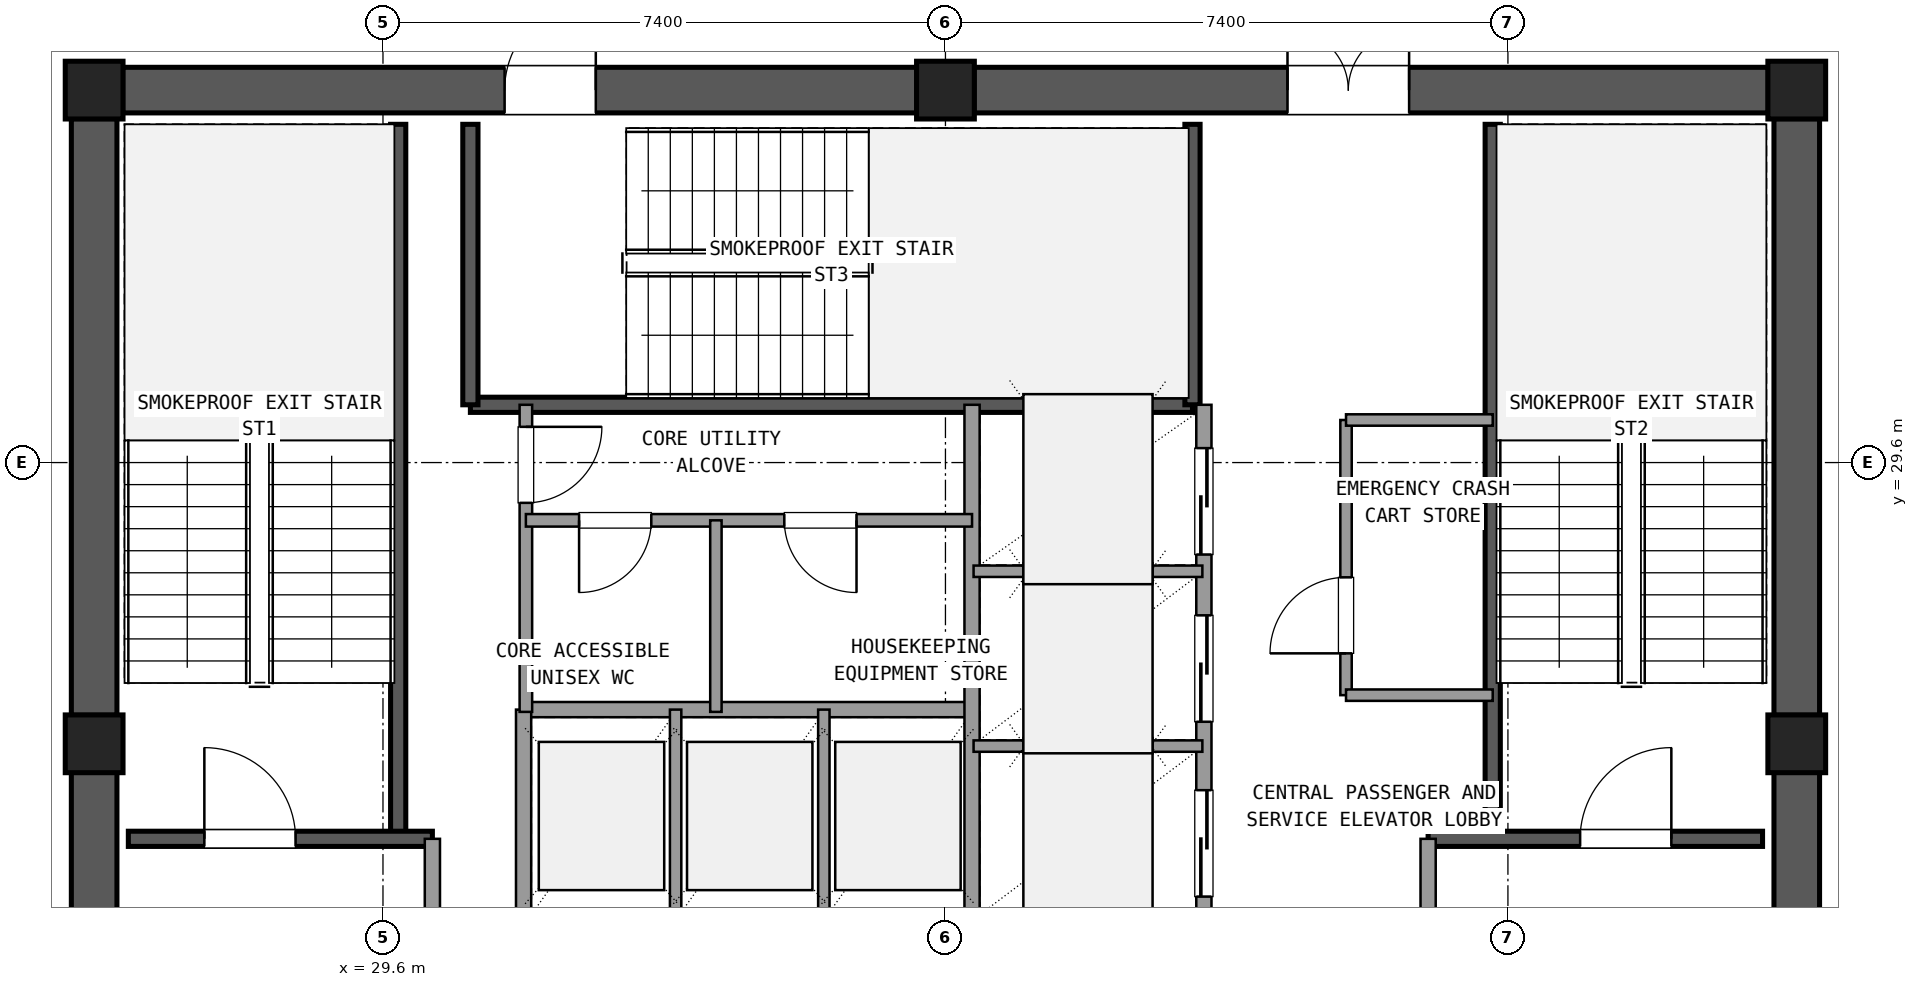
"""IFC4 building model, lengths in metres.
Left out: names, types, materials, properties, quantities, classifications, styles, units other than length and angle.
Written with IfcOpenShell. Run it as: python <this file> out.ifc"""

import sys

from ifc_helpers import new_model, si_unit, direction, frame, frame_2d, origin, origin_2d, place, context, subcontext, project, spatial, rectangle, extrude, element, fill, save


model = new_model("IFC4")
c1 = context("Model", 3, precision=1e-05, world=origin(), true_north=direction((0.0, 1.0)))
c2 = subcontext(c1, "Body", "Model", "MODEL_VIEW")
j1 = project(units=[si_unit("LENGTHUNIT", "METRE"), si_unit("PLANEANGLEUNIT", "RADIAN")], contexts=[c1])
p1 = place(None, origin())
s1 = spatial("IfcSite", under=j1, at=p1, CompositionType="ELEMENT")
p2 = place(p1, origin())
s2 = spatial("IfcBuilding", under=s1, at=p2, CompositionType="ELEMENT")
p3 = place(p2, frame((0.0, 0.0, 286.02)))
s3 = spatial("IfcBuildingStorey", under=s2, at=p3, CompositionType="ELEMENT", Elevation=286.02)
for number, where, z_axis, x_axis in (
    (1, (48.2, 25.9, 0.0), (0.0, 0.0, 1.0), (1.0, 0.0, 0.0)),
    (2, (48.2, 34.5, 0.0), (0.0, 0.0, 1.0), (1.0, 0.0, 0.0)),
    (3, (37.0, 34.5, 0.0), (0.0, 0.0, 1.0), (1.0, 0.0, 0.0)),
    (4, (25.8, 34.5, 0.0), (0.0, 0.0, 1.0), (1.0, 0.0, 0.0)),
    (5, (25.8, 25.9, 0.0), (0.0, 0.0, 1.0), (1.0, 0.0, 0.0)),
):
    element("IfcColumn", number, at=place(p3, frame(where, z_axis=z_axis, x_axis=x_axis)), inside=s3, PredefinedType="COLUMN", context=c2, shape_type="SweptSolid", body=[
        extrude(rectangle(XDim=0.76, YDim=0.76, at=origin_2d()), origin(), (0.0, 0.0, 1.0), 4.32),
    ])
p4 = place(p3, frame((48.2, 17.675, 0.0), z_axis=(0.0, 0.0, 1.0), x_axis=(0.0, 1.0, 0.0)))
e6 = element("IfcWall", 6, at=p4, inside=s3, PredefinedType="SHEAR", context=c2, shape_type="SweptSolid", body=[
    extrude(rectangle(XDim=7.85, YDim=0.6, at=frame_2d((3.925, 0.0))), origin(), (0.0, 0.0, 1.0), 4.02),
])
p5 = place(p4, frame((4.375, 0.0, 0.0)))
e7 = element("IfcOpeningElement", 7, at=p5, cuts=e6, PredefinedType="OPENING", context=c2, shape_type="SweptSolid", body=[
    extrude(rectangle(XDim=1.2, YDim=2.15, at=frame_2d((0.6, 1.075))), frame((0.0, 0.31, 0.0), z_axis=(0.0, -1.0, 0.0), x_axis=(1.0, 0.0, 0.0)), (0.0, 0.0, 1.0), 0.62),
])
p6 = place(p3, frame((48.2, 26.275, 0.0), z_axis=(0.0, 0.0, 1.0), x_axis=(0.0, 1.0, 0.0)))
e8 = element("IfcWall", 8, at=p6, inside=s3, PredefinedType="SHEAR", context=c2, shape_type="SweptSolid", body=[
    extrude(rectangle(XDim=7.85, YDim=0.6, at=frame_2d((3.925, 0.0))), origin(), (0.0, 0.0, 1.0), 4.02),
])
p7 = place(p3, frame((47.825, 34.5, 0.0), z_axis=(0.0, 0.0, 1.0), x_axis=(-1.0, 0.0, 0.0)))
e9 = element("IfcWall", 9, at=p7, inside=s3, PredefinedType="SHEAR", context=c2, shape_type="SweptSolid", body=[
    extrude(rectangle(XDim=10.45, YDim=0.6, at=frame_2d((5.225, 0.0))), origin(), (0.0, 0.0, 1.0), 4.02),
])
p8 = place(p7, frame((4.725, 0.0, 0.0)))
e10 = element("IfcOpeningElement", 10, at=p8, cuts=e9, PredefinedType="OPENING", context=c2, shape_type="SweptSolid", body=[
    extrude(rectangle(XDim=1.6, YDim=2.2, at=frame_2d((0.8, 1.1))), frame((0.0, 0.31, 0.0), z_axis=(0.0, -1.0, 0.0), x_axis=(1.0, 0.0, 0.0)), (0.0, 0.0, 1.0), 0.62),
])
p9 = place(p3, frame((36.625, 34.5, 0.0), z_axis=(0.0, 0.0, 1.0), x_axis=(-1.0, 0.0, 0.0)))
e11 = element("IfcWall", 11, at=p9, inside=s3, PredefinedType="SHEAR", context=c2, shape_type="SweptSolid", body=[
    extrude(rectangle(XDim=10.45, YDim=0.6, at=frame_2d((5.225, 0.0))), origin(), (0.0, 0.0, 1.0), 4.02),
])
p10 = place(p9, frame((4.225, 0.0, 0.0)))
e12 = element("IfcOpeningElement", 12, at=p10, cuts=e11, PredefinedType="OPENING", context=c2, shape_type="SweptSolid", body=[
    extrude(rectangle(XDim=1.2, YDim=2.15, at=frame_2d((0.6, 1.075))), frame((0.0, 0.31, 0.0), z_axis=(0.0, -1.0, 0.0), x_axis=(1.0, 0.0, 0.0)), (0.0, 0.0, 1.0), 0.62),
])
p11 = place(p3, frame((25.8, 34.125, 0.0), z_axis=(0.0, 0.0, 1.0), x_axis=(0.0, -1.0, 0.0)))
e13 = element("IfcWall", 13, at=p11, inside=s3, PredefinedType="SHEAR", context=c2, shape_type="SweptSolid", body=[
    extrude(rectangle(XDim=7.85, YDim=0.6, at=frame_2d((3.925, 0.0))), origin(), (0.0, 0.0, 1.0), 4.02),
])
p12 = place(p3, frame((25.8, 25.525, 0.0), z_axis=(0.0, 0.0, 1.0), x_axis=(0.0, -1.0, 0.0)))
e14 = element("IfcWall", 14, at=p12, inside=s3, PredefinedType="SHEAR", context=c2, shape_type="SweptSolid", body=[
    extrude(rectangle(XDim=7.85, YDim=0.6, at=frame_2d((3.925, 0.0))), origin(), (0.0, 0.0, 1.0), 4.02),
])
p13 = place(p12, frame((2.275, 0.0, 0.0)))
e15 = element("IfcOpeningElement", 15, at=p13, cuts=e14, PredefinedType="OPENING", context=c2, shape_type="SweptSolid", body=[
    extrude(rectangle(XDim=1.2, YDim=2.15, at=frame_2d((0.6, 1.075))), frame((0.0, 0.31, 0.0), z_axis=(0.0, -1.0, 0.0), x_axis=(1.0, 0.0, 0.0)), (0.0, 0.0, 1.0), 0.62),
])
p14 = place(p3, frame((29.8, 24.65, 0.0), z_axis=(0.0, 0.0, 1.0), x_axis=(0.0, 1.0, 0.0)))
e16 = element("IfcWall", 16, at=p14, inside=s3, PredefinedType="SHEAR", context=c2, shape_type="SweptSolid", body=[
    extrude(rectangle(XDim=9.4, YDim=0.2, at=frame_2d((4.7, 0.0))), origin(), (0.0, 0.0, 1.0), 4.02),
])
p15 = place(p3, frame((26.25, 24.65, 0.0), z_axis=(0.0, 0.0, 1.0), x_axis=(1.0, 0.0, 0.0)))
e17 = element("IfcWall", 17, at=p15, inside=s3, PredefinedType="SHEAR", context=c2, shape_type="SweptSolid", body=[
    extrude(rectangle(XDim=4.0, YDim=0.2, at=frame_2d((2.0, 0.0))), origin(), (0.0, 0.0, 1.0), 4.02),
])
p16 = place(p15, frame((1.0, 0.0, 0.0)))
e18 = element("IfcOpeningElement", 18, at=p16, cuts=e17, PredefinedType="OPENING", context=c2, shape_type="SweptSolid", body=[
    extrude(rectangle(XDim=1.2, YDim=2.15, at=frame_2d((0.6, 1.075))), frame((0.0, 0.11, 0.0), z_axis=(0.0, -1.0, 0.0), x_axis=(1.0, 0.0, 0.0)), (0.0, 0.0, 1.0), 0.22),
])
p17 = place(p3, frame((44.2, 24.65, 0.0), z_axis=(0.0, 0.0, 1.0), x_axis=(0.0, 1.0, 0.0)))
e19 = element("IfcWall", 19, at=p17, inside=s3, PredefinedType="SHEAR", context=c2, shape_type="SweptSolid", body=[
    extrude(rectangle(XDim=9.4, YDim=0.2, at=frame_2d((4.7, 0.0))), origin(), (0.0, 0.0, 1.0), 4.02),
])
p18 = place(p3, frame((43.35, 24.65, 0.0), z_axis=(0.0, 0.0, 1.0), x_axis=(1.0, 0.0, 0.0)))
e20 = element("IfcWall", 20, at=p18, inside=s3, PredefinedType="SHEAR", context=c2, shape_type="SweptSolid", body=[
    extrude(rectangle(XDim=4.4, YDim=0.2, at=frame_2d((2.2, 0.0))), origin(), (0.0, 0.0, 1.0), 4.02),
])
p19 = place(p18, frame((2.0, 0.0, 0.0)))
e21 = element("IfcOpeningElement", 21, at=p19, cuts=e20, PredefinedType="OPENING", context=c2, shape_type="SweptSolid", body=[
    extrude(rectangle(XDim=1.2, YDim=2.15, at=frame_2d((0.6, 1.075))), frame((0.0, 0.11, 0.0), z_axis=(0.0, -1.0, 0.0), x_axis=(1.0, 0.0, 0.0)), (0.0, 0.0, 1.0), 0.22),
])
p20 = place(p3, frame((30.75, 30.36, 0.0), z_axis=(0.0, 0.0, 1.0), x_axis=(1.0, 0.0, 0.0)))
e22 = element("IfcWall", 22, at=p20, inside=s3, PredefinedType="SHEAR", context=c2, shape_type="SweptSolid", body=[
    extrude(rectangle(XDim=9.5, YDim=0.2, at=frame_2d((4.75, 0.0))), origin(), (0.0, 0.0, 1.0), 4.02),
])
for number, where, z_axis, x_axis in (
    (23, (30.75, 30.36, 0.0), (0.0, 0.0, 1.0), (0.0, 1.0, 0.0)),
    (24, (40.25, 30.36, 0.0), (0.0, 0.0, 1.0), (0.0, 1.0, 0.0)),
):
    element("IfcWall", number, at=place(p3, frame(where, z_axis=z_axis, x_axis=x_axis)), inside=s3, PredefinedType="SHEAR", context=c2, shape_type="SweptSolid", body=[
        extrude(rectangle(XDim=3.69, YDim=0.2, at=frame_2d((1.845, 0.0))), origin(), (0.0, 0.0, 1.0), 4.02),
    ])
p21 = place(p3, frame((30.25, 17.75, 0.0), z_axis=(0.0, 0.0, 1.0), x_axis=(0.0, 1.0, 0.0)))
e25 = element("IfcWall", 25, at=p21, inside=s3, PredefinedType="SOLIDWALL", context=c2, shape_type="SweptSolid", body=[
    extrude(rectangle(XDim=6.9, YDim=0.2, at=frame_2d((3.45, 0.0))), origin(), (0.0, 0.0, 1.0), 2.93),
])
p22 = place(p21, frame((4.15, 0.0, 0.0)))
e26 = element("IfcOpeningElement", 26, at=p22, cuts=e25, PredefinedType="OPENING", context=c2, shape_type="SweptSolid", body=[
    extrude(rectangle(XDim=1.2, YDim=2.15, at=frame_2d((0.6, 1.075))), frame((0.0, 0.11, 0.0), z_axis=(0.0, -1.0, 0.0), x_axis=(1.0, 0.0, 0.0)), (0.0, 0.0, 1.0), 0.22),
])
p23 = place(p3, frame((43.35, 17.75, 0.0), z_axis=(0.0, 0.0, 1.0), x_axis=(0.0, 1.0, 0.0)))
e27 = element("IfcWall", 27, at=p23, inside=s3, PredefinedType="SOLIDWALL", context=c2, shape_type="SweptSolid", body=[
    extrude(rectangle(XDim=6.9, YDim=0.2, at=frame_2d((3.45, 0.0))), origin(), (0.0, 0.0, 1.0), 2.93),
])
p24 = place(p23, frame((4.15, 0.0, 0.0)))
e28 = element("IfcOpeningElement", 28, at=p24, cuts=e27, PredefinedType="OPENING", context=c2, shape_type="SweptSolid", body=[
    extrude(rectangle(XDim=1.2, YDim=2.15, at=frame_2d((0.6, 1.075))), frame((0.0, 0.11, 0.0), z_axis=(0.0, -1.0, 0.0), x_axis=(1.0, 0.0, 0.0)), (0.0, 0.0, 1.0), 0.22),
])
p25 = place(p3, frame((31.45, 26.35, 0.0), z_axis=(0.0, 0.0, 1.0), x_axis=(1.0, 0.0, 0.0)))
e29 = element("IfcWall", 29, at=p25, inside=s3, PredefinedType="SOLIDWALL", context=c2, shape_type="SweptSolid", body=[
    extrude(rectangle(XDim=5.9, YDim=0.2, at=frame_2d((2.95, 0.0))), origin(), (0.0, 0.0, 1.0), 2.93),
])
p26 = place(p3, frame((31.45, 23.54, 0.0), z_axis=(0.0, 0.0, 1.0), x_axis=(0.0, 1.0, 0.0)))
e30 = element("IfcWall", 30, at=p26, inside=s3, PredefinedType="SOLIDWALL", context=c2, shape_type="SweptSolid", body=[
    extrude(rectangle(XDim=2.81, YDim=0.2, at=frame_2d((1.405, 0.0))), origin(), (0.0, 0.0, 1.0), 2.93),
])
for number, where, z_axis, x_axis in (
    (31, (33.45, 23.54, 0.0), (0.0, 0.0, 1.0), (0.0, 1.0, 0.0)),
    (32, (35.4, 23.54, 0.0), (0.0, 0.0, 1.0), (0.0, 1.0, 0.0)),
):
    element("IfcWall", number, at=place(p3, frame(where, z_axis=z_axis, x_axis=x_axis)), inside=s3, PredefinedType="PARTITIONING", context=c2, shape_type="SweptSolid", body=[
        extrude(rectangle(XDim=2.81, YDim=0.15, at=frame_2d((1.405, 0.0))), origin(), (0.0, 0.0, 1.0), 2.93),
    ])
p27 = place(p3, frame((37.35, 23.54, 0.0), z_axis=(0.0, 0.0, 1.0), x_axis=(0.0, 1.0, 0.0)))
e33 = element("IfcWall", 33, at=p27, inside=s3, PredefinedType="SOLIDWALL", context=c2, shape_type="SweptSolid", body=[
    extrude(rectangle(XDim=6.82, YDim=0.2, at=frame_2d((3.41, 0.0))), origin(), (0.0, 0.0, 1.0), 2.93),
])
p28 = place(p3, frame((40.4, 23.54, 0.0), z_axis=(0.0, 0.0, 1.0), x_axis=(0.0, 1.0, 0.0)))
e34 = element("IfcWall", 34, at=p28, inside=s3, PredefinedType="SOLIDWALL", context=c2, shape_type="SweptSolid", body=[
    extrude(rectangle(XDim=6.82, YDim=0.2, at=frame_2d((3.41, 0.0))), origin(), (0.0, 0.0, 1.0), 2.93),
])
p29 = place(p28, frame((0.35, 0.0, 0.0)))
e35 = element("IfcOpeningElement", 35, at=p29, cuts=e34, PredefinedType="OPENING", context=c2, shape_type="SweptSolid", body=[
    extrude(rectangle(XDim=1.4, YDim=2.2, at=frame_2d((0.7, 1.1))), frame((0.0, 0.11, 0.0), z_axis=(0.0, -1.0, 0.0), x_axis=(1.0, 0.0, 0.0)), (0.0, 0.0, 1.0), 0.22),
])
p30 = place(p28, frame((2.65, 0.0, 0.0)))
e36 = element("IfcOpeningElement", 36, at=p30, cuts=e34, PredefinedType="OPENING", context=c2, shape_type="SweptSolid", body=[
    extrude(rectangle(XDim=1.4, YDim=2.2, at=frame_2d((0.7, 1.1))), frame((0.0, 0.11, 0.0), z_axis=(0.0, -1.0, 0.0), x_axis=(1.0, 0.0, 0.0)), (0.0, 0.0, 1.0), 0.22),
])
p31 = place(p28, frame((4.85, 0.0, 0.0)))
e37 = element("IfcOpeningElement", 37, at=p31, cuts=e34, PredefinedType="OPENING", context=c2, shape_type="SweptSolid", body=[
    extrude(rectangle(XDim=1.4, YDim=2.2, at=frame_2d((0.7, 1.1))), frame((0.0, 0.11, 0.0), z_axis=(0.0, -1.0, 0.0), x_axis=(1.0, 0.0, 0.0)), (0.0, 0.0, 1.0), 0.22),
])
for number, where, z_axis, x_axis in (
    (38, (37.37, 25.87, 0.0), (0.0, 0.0, 1.0), (1.0, 0.0, 0.0)),
    (39, (37.37, 28.17, 0.0), (0.0, 0.0, 1.0), (1.0, 0.0, 0.0)),
):
    element("IfcWall", number, at=place(p3, frame(where, z_axis=z_axis, x_axis=x_axis)), inside=s3, PredefinedType="PARTITIONING", context=c2, shape_type="SweptSolid", body=[
        extrude(rectangle(XDim=3.01, YDim=0.15, at=frame_2d((1.505, 0.0))), origin(), (0.0, 0.0, 1.0), 2.93),
    ])
p32 = place(p3, frame((42.27, 26.54, 0.0), z_axis=(0.0, 0.0, 1.0), x_axis=(0.0, 1.0, 0.0)))
e40 = element("IfcWall", 40, at=p32, inside=s3, PredefinedType="PARTITIONING", context=c2, shape_type="SweptSolid", body=[
    extrude(rectangle(XDim=3.62, YDim=0.15, at=frame_2d((1.81, 0.0))), origin(), (0.0, 0.0, 1.0), 2.93),
])
p33 = place(p32, frame((0.55, 0.0, 0.0)))
e41 = element("IfcOpeningElement", 41, at=p33, cuts=e40, PredefinedType="OPENING", context=c2, shape_type="SweptSolid", body=[
    extrude(rectangle(XDim=1.0, YDim=2.15, at=frame_2d((0.5, 1.075))), frame((0.0, 0.085, 0.0), z_axis=(0.0, -1.0, 0.0), x_axis=(1.0, 0.0, 0.0)), (0.0, 0.0, 1.0), 0.17),
])
for number, where, z_axis, x_axis in (
    (42, (42.27, 26.54, 0.0), (0.0, 0.0, 1.0), (1.0, 0.0, 0.0)),
    (43, (42.27, 30.16, 0.0), (0.0, 0.0, 1.0), (1.0, 0.0, 0.0)),
):
    element("IfcWall", number, at=place(p3, frame(where, z_axis=z_axis, x_axis=x_axis)), inside=s3, PredefinedType="PARTITIONING", context=c2, shape_type="SweptSolid", body=[
        extrude(rectangle(XDim=1.93, YDim=0.15, at=frame_2d((0.965, 0.0))), origin(), (0.0, 0.0, 1.0), 2.93),
    ])
p34 = place(p3, frame((31.48, 26.32, 0.0), z_axis=(0.0, 0.0, 1.0), x_axis=(0.0, 1.0, 0.0)))
e44 = element("IfcWall", 44, at=p34, inside=s3, PredefinedType="PLUMBINGWALL", context=c2, shape_type="SweptSolid", body=[
    extrude(rectangle(XDim=4.04, YDim=0.165, at=frame_2d((2.02, 0.0))), origin(), (0.0, 0.0, 1.0), 2.93),
])
p35 = place(p34, frame((2.75, 0.0, 0.0)))
e45 = element("IfcOpeningElement", 45, at=p35, cuts=e44, PredefinedType="OPENING", context=c2, shape_type="SweptSolid", body=[
    extrude(rectangle(XDim=1.0, YDim=2.15, at=frame_2d((0.5, 1.075))), frame((0.0, 0.093, 0.0), z_axis=(0.0, -1.0, 0.0), x_axis=(1.0, 0.0, 0.0)), (0.0, 0.0, 1.0), 0.185),
])
p36 = place(p3, frame((31.48, 28.84, 0.0), z_axis=(0.0, 0.0, 1.0), x_axis=(1.0, 0.0, 0.0)))
e46 = element("IfcWall", 46, at=p36, inside=s3, PredefinedType="PLUMBINGWALL", context=c2, shape_type="SweptSolid", body=[
    extrude(rectangle(XDim=5.87, YDim=0.165, at=frame_2d((2.935, 0.0))), origin(), (0.0, 0.0, 1.0), 2.93),
])
p37 = place(p36, frame((0.7, 0.0, 0.0)))
e47 = element("IfcOpeningElement", 47, at=p37, cuts=e46, PredefinedType="OPENING", context=c2, shape_type="SweptSolid", body=[
    extrude(rectangle(XDim=0.95, YDim=2.1, at=frame_2d((0.475, 1.05))), frame((0.0, 0.093, 0.0), z_axis=(0.0, -1.0, 0.0), x_axis=(1.0, 0.0, 0.0)), (0.0, 0.0, 1.0), 0.185),
])
p38 = place(p36, frame((3.4, 0.0, 0.0)))
e48 = element("IfcOpeningElement", 48, at=p38, cuts=e46, PredefinedType="OPENING", context=c2, shape_type="SweptSolid", body=[
    extrude(rectangle(XDim=0.95, YDim=2.1, at=frame_2d((0.475, 1.05))), frame((0.0, 0.093, 0.0), z_axis=(0.0, -1.0, 0.0), x_axis=(1.0, 0.0, 0.0)), (0.0, 0.0, 1.0), 0.185),
])
p39 = place(p3, frame((33.98, 26.32, 0.0), z_axis=(0.0, 0.0, 1.0), x_axis=(0.0, 1.0, 0.0)))
e49 = element("IfcWall", 49, at=p39, inside=s3, PredefinedType="PARTITIONING", context=c2, shape_type="SweptSolid", body=[
    extrude(rectangle(XDim=2.52, YDim=0.15, at=frame_2d((1.26, 0.0))), origin(), (0.0, 0.0, 1.0), 2.93),
])
p40 = place(p16, origin())
e50 = element("IfcDoor", 50, at=p40, inside=s3, OperationType="SINGLE_SWING_LEFT", PredefinedType="DOOR", context=c2, shape_type="SweptSolid", body=[
    extrude(rectangle(XDim=1.2, YDim=2.15, at=frame_2d((0.6, 1.075))), frame((0.0, 0.025, 0.0), z_axis=(0.0, -1.0, 0.0), x_axis=(1.0, 0.0, 0.0)), (0.0, 0.0, 1.0), 0.05),
])
fill(e18, e50)
p41 = place(p19, origin())
e51 = element("IfcDoor", 51, at=p41, inside=s3, OperationType="SINGLE_SWING_RIGHT", PredefinedType="DOOR", context=c2, shape_type="SweptSolid", body=[
    extrude(rectangle(XDim=1.2, YDim=2.15, at=frame_2d((0.6, 1.075))), frame((0.0, 0.025, 0.0), z_axis=(0.0, -1.0, 0.0), x_axis=(1.0, 0.0, 0.0)), (0.0, 0.0, 1.0), 0.05),
])
fill(e21, e51)
p42 = place(p8, frame((1.6, 0.0, 0.0), z_axis=(0.0, 0.0, 1.0), x_axis=(-1.0, 0.0, 0.0)))
e52 = element("IfcDoor", 52, at=p42, inside=s3, OperationType="DOUBLE_DOOR_SINGLE_SWING", PredefinedType="DOOR", context=c2, shape_type="SweptSolid", body=[
    extrude(rectangle(XDim=1.6, YDim=2.2, at=frame_2d((0.8, 1.1))), frame((0.0, 0.025, 0.0), z_axis=(0.0, -1.0, 0.0), x_axis=(1.0, 0.0, 0.0)), (0.0, 0.0, 1.0), 0.05),
])
fill(e10, e52)
p43 = place(p10, frame((1.2, 0.0, 0.0), z_axis=(0.0, 0.0, 1.0), x_axis=(-1.0, 0.0, 0.0)))
e53 = element("IfcDoor", 53, at=p43, inside=s3, OperationType="SINGLE_SWING_LEFT", PredefinedType="DOOR", context=c2, shape_type="SweptSolid", body=[
    extrude(rectangle(XDim=1.2, YDim=2.15, at=frame_2d((0.6, 1.075))), frame((0.0, 0.025, 0.0), z_axis=(0.0, -1.0, 0.0), x_axis=(1.0, 0.0, 0.0)), (0.0, 0.0, 1.0), 0.05),
])
fill(e12, e53)
p44 = place(p29, origin())
e54 = element("IfcDoor", 54, at=p44, inside=s3, OperationType="SLIDING_TO_LEFT", PredefinedType="DOOR", context=c2, shape_type="SweptSolid", body=[
    extrude(rectangle(XDim=1.4, YDim=2.2, at=frame_2d((0.7, 1.1))), frame((0.0, 0.025, 0.0), z_axis=(0.0, -1.0, 0.0), x_axis=(1.0, 0.0, 0.0)), (0.0, 0.0, 1.0), 0.05),
])
fill(e35, e54)
p45 = place(p30, origin())
e55 = element("IfcDoor", 55, at=p45, inside=s3, OperationType="SLIDING_TO_LEFT", PredefinedType="DOOR", context=c2, shape_type="SweptSolid", body=[
    extrude(rectangle(XDim=1.4, YDim=2.2, at=frame_2d((0.7, 1.1))), frame((0.0, 0.025, 0.0), z_axis=(0.0, -1.0, 0.0), x_axis=(1.0, 0.0, 0.0)), (0.0, 0.0, 1.0), 0.05),
])
fill(e36, e55)
p46 = place(p31, origin())
e56 = element("IfcDoor", 56, at=p46, inside=s3, OperationType="SLIDING_TO_RIGHT", PredefinedType="DOOR", context=c2, shape_type="SweptSolid", body=[
    extrude(rectangle(XDim=1.4, YDim=2.2, at=frame_2d((0.7, 1.1))), frame((0.0, 0.025, 0.0), z_axis=(0.0, -1.0, 0.0), x_axis=(1.0, 0.0, 0.0)), (0.0, 0.0, 1.0), 0.05),
])
fill(e37, e56)
p47 = place(p33, origin())
e57 = element("IfcDoor", 57, at=p47, inside=s3, OperationType="SINGLE_SWING_LEFT", PredefinedType="DOOR", context=c2, shape_type="SweptSolid", body=[
    extrude(rectangle(XDim=1.0, YDim=2.15, at=frame_2d((0.5, 1.075))), frame((0.0, 0.025, 0.0), z_axis=(0.0, -1.0, 0.0), x_axis=(1.0, 0.0, 0.0)), (0.0, 0.0, 1.0), 0.05),
])
fill(e41, e57)
p48 = place(p35, frame((1.0, 0.0, 0.0), z_axis=(0.0, 0.0, 1.0), x_axis=(-1.0, 0.0, 0.0)))
e58 = element("IfcDoor", 58, at=p48, inside=s3, OperationType="SINGLE_SWING_RIGHT", PredefinedType="DOOR", context=c2, shape_type="SweptSolid", body=[
    extrude(rectangle(XDim=1.0, YDim=2.15, at=frame_2d((0.5, 1.075))), frame((0.0, 0.025, 0.0), z_axis=(0.0, -1.0, 0.0), x_axis=(1.0, 0.0, 0.0)), (0.0, 0.0, 1.0), 0.05),
])
fill(e45, e58)
p49 = place(p37, frame((0.95, 0.0, 0.0), z_axis=(0.0, 0.0, 1.0), x_axis=(-1.0, 0.0, 0.0)))
e59 = element("IfcDoor", 59, at=p49, inside=s3, OperationType="SINGLE_SWING_LEFT", PredefinedType="DOOR", context=c2, shape_type="SweptSolid", body=[
    extrude(rectangle(XDim=0.95, YDim=2.1, at=frame_2d((0.475, 1.05))), frame((0.0, 0.025, 0.0), z_axis=(0.0, -1.0, 0.0), x_axis=(1.0, 0.0, 0.0)), (0.0, 0.0, 1.0), 0.05),
])
fill(e47, e59)
p50 = place(p38, frame((0.95, 0.0, 0.0), z_axis=(0.0, 0.0, 1.0), x_axis=(-1.0, 0.0, 0.0)))
e60 = element("IfcDoor", 60, at=p50, inside=s3, OperationType="SINGLE_SWING_RIGHT", PredefinedType="DOOR", context=c2, shape_type="SweptSolid", body=[
    extrude(rectangle(XDim=0.95, YDim=2.1, at=frame_2d((0.475, 1.05))), frame((0.0, 0.025, 0.0), z_axis=(0.0, -1.0, 0.0), x_axis=(1.0, 0.0, 0.0)), (0.0, 0.0, 1.0), 0.05),
])
fill(e48, e60)
save(model, sys.argv[1])
